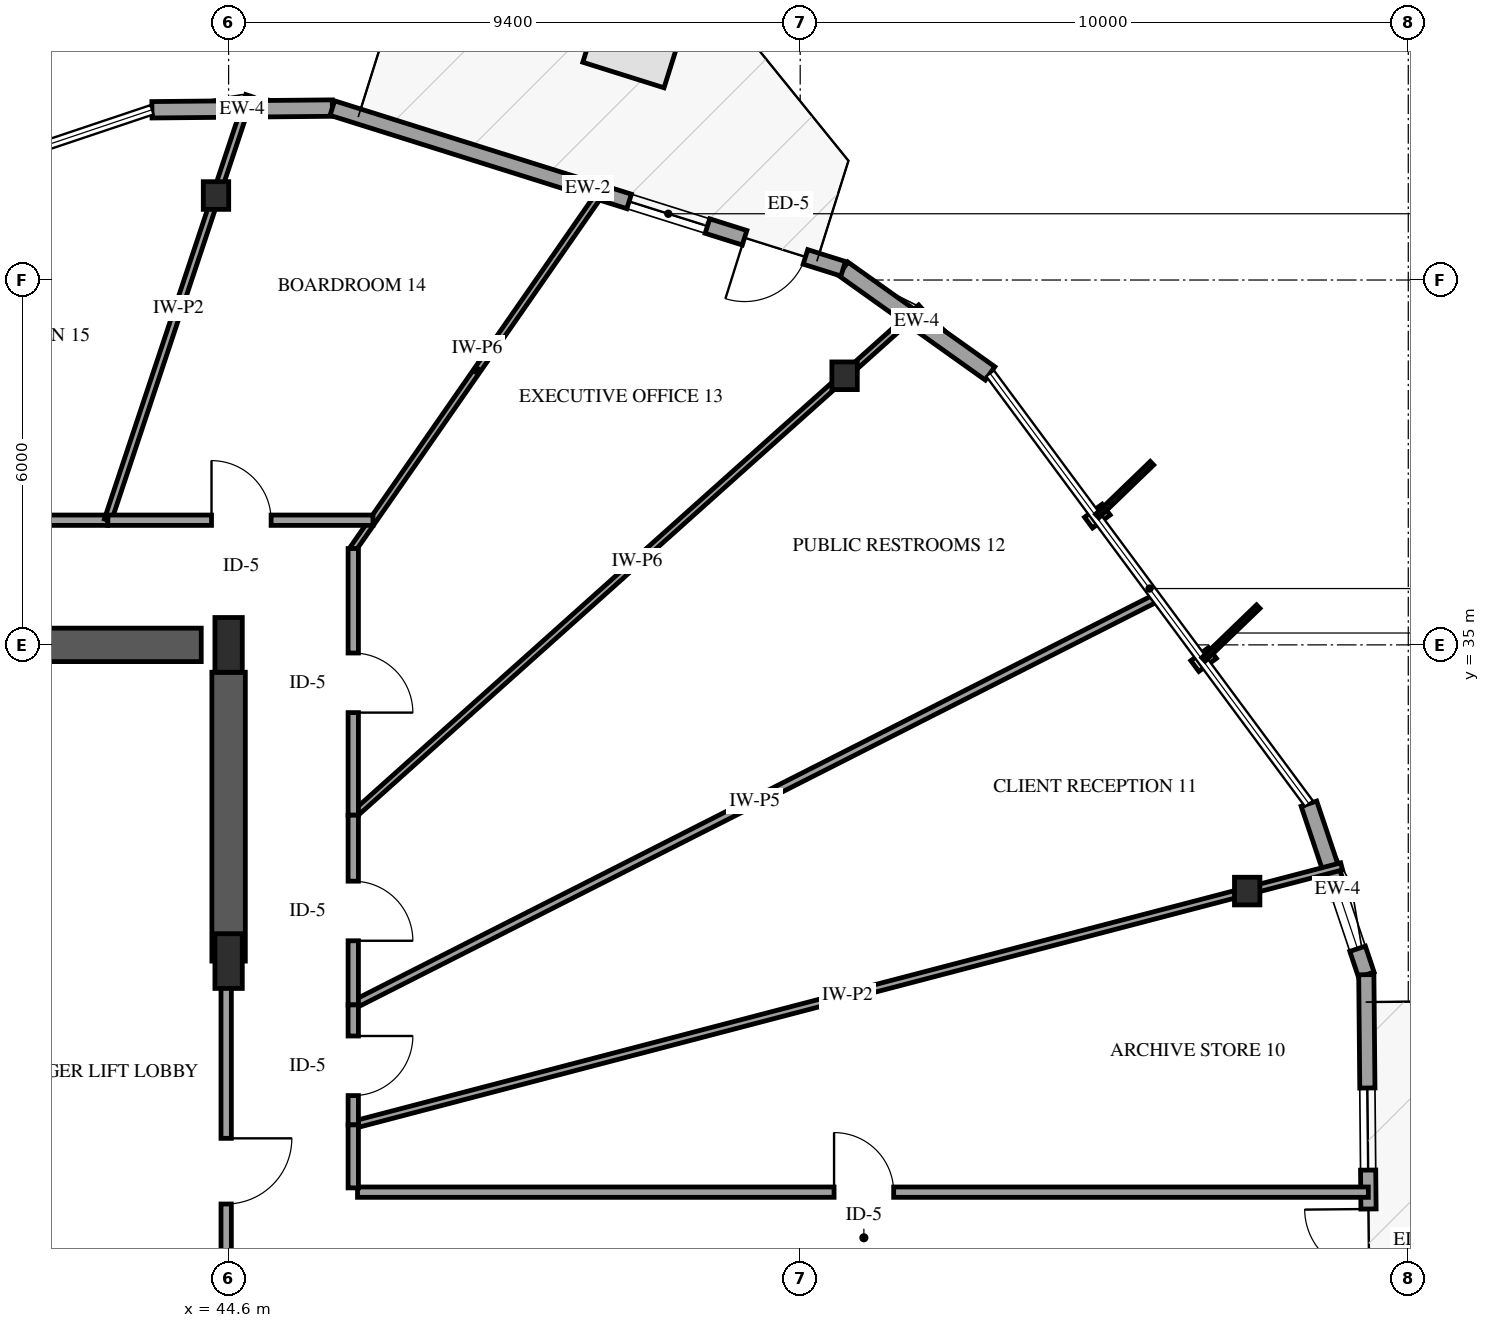
"""IFC4 building model, lengths in metres.
Left out: names, types, materials, properties, quantities, classifications, styles, units other than length and angle.
Written with IfcOpenShell. Run it as: python <this file> out.ifc"""

import sys

from ifc_helpers import new_model, si_unit, direction, frame, frame_2d, origin, origin_2d, place, context, subcontext, project, spatial, rectangle, i_section, extrude, element, fill, save


model = new_model("IFC4")
c1 = context("Model", 3, precision=1e-05, world=origin(), true_north=direction((0.0, 1.0)))
c2 = subcontext(c1, "Body", "Model", "MODEL_VIEW")
j1 = project(units=[si_unit("LENGTHUNIT", "METRE"), si_unit("PLANEANGLEUNIT", "RADIAN")], contexts=[c1])
p1 = place(None, origin())
s1 = spatial("IfcSite", under=j1, at=p1, CompositionType="ELEMENT")
p2 = place(p1, origin())
s2 = spatial("IfcBuilding", under=s1, at=p2, CompositionType="ELEMENT")
p3 = place(p2, frame((0.0, 0.0, 103.0)))
s3 = spatial("IfcBuildingStorey", under=s2, at=p3, CompositionType="ELEMENT", Elevation=103.0)
p4 = place(p3, frame((41.3, 35.0, 0.0), z_axis=(0.0, 0.0, 1.0), x_axis=(1.0, 0.0, 0.0)))
e1 = element("IfcWall", 1, at=p4, inside=s3, PredefinedType="SHEAR", context=c2, shape_type="SweptSolid", body=[
    extrude(rectangle(XDim=2.85, YDim=0.55, at=frame_2d((1.425, 0.0))), origin(), (0.0, 0.0, 1.0), 3.9),
])
p5 = place(p3, frame((44.6, 29.8, 0.0), z_axis=(0.0, 0.0, 1.0), x_axis=(0.0, 1.0, 0.0)))
e2 = element("IfcWall", 2, at=p5, inside=s3, PredefinedType="SHEAR", context=c2, shape_type="SweptSolid", body=[
    extrude(rectangle(XDim=4.75, YDim=0.55, at=frame_2d((2.375, 0.0))), origin(), (0.0, 0.0, 1.0), 3.9),
])
for number, where, z_axis, x_axis in (
    (3, (44.6, 29.8, 0.0), (0.0, 0.0, 1.0), (1.0, 0.0, 0.0)),
    (4, (44.6, 35.0, 0.0), (0.0, 0.0, 1.0), (1.0, 0.0, 0.0)),
):
    element("IfcColumn", number, at=place(p3, frame(where, z_axis=z_axis, x_axis=x_axis)), inside=s3, PredefinedType="PILASTER", context=c2, shape_type="SweptSolid", body=[
        extrude(rectangle(XDim=0.45, YDim=0.9, at=origin_2d()), origin(), (0.0, 0.0, 1.0), 3.9),
    ])
for number, where, z_axis, x_axis in (
    (5, (61.351, 30.951, 0.0), (0.0, 0.0, 1.0), (1.0, 0.0, 0.0)),
    (6, (54.73, 39.425, 0.0), (0.0, 0.0, 1.0), (1.0, 0.0, 0.0)),
    (7, (44.393, 42.389, 0.0), (0.0, 0.0, 1.0), (1.0, 0.0, 0.0)),
):
    element("IfcColumn", number, at=place(p3, frame(where, z_axis=z_axis, x_axis=x_axis)), inside=s3, PredefinedType="COLUMN", context=c2, shape_type="SweptSolid", body=[
        extrude(i_section(OverallWidth=0.418, OverallDepth=0.455, WebThickness=0.042, FlangeThickness=0.068, FilletRadius=0.038, at=origin_2d()), origin(), (0.0, 0.0, 1.0), 3.9),
    ])
for number, where, z_axis, x_axis in (
    (8, (57.123, 39.464, 0.0), (0.0, 0.0, 1.0), (-0.814, 0.58, 0.0)),
    (9, (46.306, 43.827, 0.0), (0.0, 0.0, 1.0), (-1.0, -0.009, 0.0)),
):
    element("IfcWall", number, at=place(p3, frame(where, z_axis=z_axis, x_axis=x_axis)), inside=s3, PredefinedType="SOLIDWALL", context=c2, shape_type="SweptSolid", body=[
        extrude(rectangle(XDim=2.967, YDim=0.27, at=frame_2d((1.483, 0.0))), origin(), (0.0, 0.0, 1.0), 2.979),
    ])
p6 = place(p3, frame((54.707, 41.185, 0.0), z_axis=(0.0, 0.0, 1.0), x_axis=(-0.953934793106, 0.300014017175, 0.0)))
e10 = element("IfcWall", 10, at=p6, inside=s3, PredefinedType="SOLIDWALL", context=c2, shape_type="SweptSolid", body=[
    extrude(rectangle(XDim=8.807, YDim=0.25, at=frame_2d((4.403, 0.0))), origin(), (0.0, 0.0, 1.0), 2.979),
])
p7 = place(p6, frame((0.65, 0.0, 0.0)))
e11 = element("IfcOpeningElement", 11, at=p7, cuts=e10, PredefinedType="OPENING", context=c2, shape_type="SweptSolid", body=[
    extrude(rectangle(XDim=1.05, YDim=2.15, at=frame_2d((0.525, 1.075))), frame((0.0, 0.135, 0.0), z_axis=(0.0, -1.0, 0.0), x_axis=(1.0, 0.0, 0.0)), (0.0, 0.0, 1.0), 0.27),
])
p8 = place(p6, frame((2.34, 0.0, 0.72)))
e12 = element("IfcOpeningElement", 12, at=p8, cuts=e10, PredefinedType="OPENING", context=c2, shape_type="SweptSolid", body=[
    extrude(rectangle(XDim=1.35, YDim=1.65, at=frame_2d((0.675, 0.825))), frame((0.0, 0.135, 0.0), z_axis=(0.0, -1.0, 0.0), x_axis=(1.0, 0.0, 0.0)), (0.0, 0.0, 1.0), 0.27),
])
p9 = place(p3, frame((63.31, 29.576, 0.0), z_axis=(0.0, 0.0, 1.0), x_axis=(-0.317980066672, 0.948097398583, 0.0)))
e13 = element("IfcWall", 13, at=p9, inside=s3, PredefinedType="SOLIDWALL", context=c2, shape_type="SweptSolid", body=[
    extrude(rectangle(XDim=2.967, YDim=0.27, at=frame_2d((1.483, 0.0))), origin(), (0.0, 0.0, 1.0), 2.979),
])
p10 = place(p9, frame((0.45, 0.0, 0.75)))
e14 = element("IfcOpeningElement", 14, at=p10, cuts=e13, PredefinedType="OPENING", context=c2, shape_type="SweptSolid", body=[
    extrude(rectangle(XDim=0.9, YDim=1.5, at=frame_2d((0.45, 0.75))), frame((0.0, 0.145, 0.0), z_axis=(0.0, -1.0, 0.0), x_axis=(1.0, 0.0, 0.0)), (0.0, 0.0, 1.0), 0.29),
])
p11 = place(p3, frame((63.393, 20.77, 0.0), z_axis=(0.0, 0.0, 1.0), x_axis=(-0.009425958451, 0.999955574667, 0.0)))
e15 = element("IfcWall", 15, at=p11, inside=s3, PredefinedType="SOLIDWALL", context=c2, shape_type="SweptSolid", body=[
    extrude(rectangle(XDim=8.806, YDim=0.25, at=frame_2d((4.403, 0.0))), origin(), (0.0, 0.0, 1.0), 2.979),
])
p12 = place(p11, frame((3.903, 0.0, 0.0)))
e16 = element("IfcOpeningElement", 16, at=p12, cuts=e15, PredefinedType="OPENING", context=c2, shape_type="SweptSolid", body=[
    extrude(rectangle(XDim=1.05, YDim=2.15, at=frame_2d((0.525, 1.075))), frame((0.0, 0.135, 0.0), z_axis=(0.0, -1.0, 0.0), x_axis=(1.0, 0.0, 0.0)), (0.0, 0.0, 1.0), 0.27),
])
p13 = place(p11, frame((0.44, 0.0, 0.72)))
e17 = element("IfcOpeningElement", 17, at=p13, cuts=e15, PredefinedType="OPENING", context=c2, shape_type="SweptSolid", body=[
    extrude(rectangle(XDim=1.35, YDim=1.65, at=frame_2d((0.675, 0.825))), frame((0.0, 0.135, 0.0), z_axis=(0.0, -1.0, 0.0), x_axis=(1.0, 0.0, 0.0)), (0.0, 0.0, 1.0), 0.27),
])
p14 = place(p11, frame((5.593, 0.0, 0.72)))
e18 = element("IfcOpeningElement", 18, at=p14, cuts=e15, PredefinedType="OPENING", context=c2, shape_type="SweptSolid", body=[
    extrude(rectangle(XDim=1.35, YDim=1.65, at=frame_2d((0.675, 0.825))), frame((0.0, 0.135, 0.0), z_axis=(0.0, -1.0, 0.0), x_axis=(1.0, 0.0, 0.0)), (0.0, 0.0, 1.0), 0.27),
])
p15 = place(p3, frame((46.65, 27.106, 0.0), z_axis=(0.0, 0.0, 1.0), x_axis=(0.967460609726, 0.253021676203, 0.0)))
e19 = element("IfcWall", 19, at=p15, inside=s3, PredefinedType="PARTITIONING", context=c2, shape_type="SweptSolid", body=[
    extrude(rectangle(XDim=16.801, YDim=0.12, at=frame_2d((8.4, 0.0))), origin(), (0.0, 0.0, 1.0), 2.895),
])
p16 = place(p3, frame((46.72, 26.0, 0.0), z_axis=(0.0, 0.0, 1.0), x_axis=(1.0, 0.0, 0.0)))
e20 = element("IfcWall", 20, at=p16, inside=s3, PredefinedType="PARTITIONING", context=c2, shape_type="SweptSolid", body=[
    extrude(rectangle(XDim=16.623, YDim=0.17, at=frame_2d((8.312, 0.0))), origin(), (0.0, 0.0, 1.0), 3.6),
])
p17 = place(p16, frame((7.837, 0.0, 0.0)))
e21 = element("IfcOpeningElement", 21, at=p17, cuts=e20, PredefinedType="OPENING", context=c2, shape_type="SweptSolid", body=[
    extrude(rectangle(XDim=0.98, YDim=2.15, at=frame_2d((0.49, 1.075))), frame((0.0, 0.095, 0.0), z_axis=(0.0, -1.0, 0.0), x_axis=(1.0, 0.0, 0.0)), (0.0, 0.0, 1.0), 0.19),
])
p18 = place(p3, frame((46.65, 29.079, 0.0), z_axis=(0.0, 0.0, 1.0), x_axis=(0.891987023653, 0.452061002117, 0.0)))
e22 = element("IfcWall", 22, at=p18, inside=s3, PredefinedType="PARTITIONING", context=c2, shape_type="SweptSolid", body=[
    extrude(rectangle(XDim=14.807, YDim=0.13, at=frame_2d((7.404, 0.0))), origin(), (0.0, 0.0, 1.0), 3.6),
])
p19 = place(p3, frame((46.65, 32.199, 0.0), z_axis=(0.0, 0.0, 1.0), x_axis=(0.74533867863, 0.666686023655, 0.0)))
e23 = element("IfcWall", 23, at=p19, inside=s3, PredefinedType="PARTITIONING", context=c2, shape_type="SweptSolid", body=[
    extrude(rectangle(XDim=12.525, YDim=0.11, at=frame_2d((6.262, 0.0))), origin(), (0.0, 0.0, 1.0), 2.978),
])
p20 = place(p3, frame((34.81, 37.05, 0.0), z_axis=(0.0, 0.0, 1.0), x_axis=(1.0, 0.0, 0.0)))
e24 = element("IfcWall", 24, at=p20, inside=s3, PredefinedType="PARTITIONING", context=c2, shape_type="SweptSolid", body=[
    extrude(rectangle(XDim=7.804, YDim=0.17, at=frame_2d((3.902, 0.0))), origin(), (0.0, 0.0, 1.0), 3.6),
])
p21 = place(p20, frame((3.427, 0.0, 0.0)))
e25 = element("IfcOpeningElement", 25, at=p21, cuts=e24, PredefinedType="OPENING", context=c2, shape_type="SweptSolid", body=[
    extrude(rectangle(XDim=0.98, YDim=2.15, at=frame_2d((0.49, 1.075))), frame((0.0, 0.095, 0.0), z_axis=(0.0, -1.0, 0.0), x_axis=(1.0, 0.0, 0.0)), (0.0, 0.0, 1.0), 0.19),
])
p22 = place(p3, frame((42.614, 37.05, 0.0), z_axis=(0.0, 0.0, 1.0), x_axis=(0.3159789006, 0.948766216924, 0.0)))
e26 = element("IfcWall", 26, at=p22, inside=s3, PredefinedType="PARTITIONING", context=c2, shape_type="SweptSolid", body=[
    extrude(rectangle(XDim=7.358, YDim=0.12, at=frame_2d((3.679, 0.0))), origin(), (0.0, 0.0, 1.0), 2.895),
])
p23 = place(p3, frame((46.65, 36.584, 0.0), z_axis=(0.0, 0.0, 1.0), x_axis=(0.570692229292, 0.821164039292, 0.0)))
e27 = element("IfcWall", 27, at=p23, inside=s3, PredefinedType="PARTITIONING", context=c2, shape_type="SweptSolid", body=[
    extrude(rectangle(XDim=7.13, YDim=0.11, at=frame_2d((3.565, 0.0))), origin(), (0.0, 0.0, 1.0), 2.974),
])
p24 = place(p3, frame((44.56, 29.8, 0.0), z_axis=(0.0, 0.0, 1.0), x_axis=(0.0, -1.0, 0.0)))
e28 = element("IfcWall", 28, at=p24, inside=s3, PredefinedType="PARTITIONING", context=c2, shape_type="SweptSolid", body=[
    extrude(rectangle(XDim=6.91, YDim=0.17, at=frame_2d((3.455, 0.0))), origin(), (0.0, 0.0, 1.0), 2.64),
])
p25 = place(p24, frame((2.915, 0.0, 0.0)))
e29 = element("IfcOpeningElement", 29, at=p25, cuts=e28, PredefinedType="OPENING", context=c2, shape_type="SweptSolid", body=[
    extrude(rectangle(XDim=1.08, YDim=2.15, at=frame_2d((0.54, 1.075))), frame((0.0, 0.095, 0.0), z_axis=(0.0, -1.0, 0.0), x_axis=(1.0, 0.0, 0.0)), (0.0, 0.0, 1.0), 0.19),
])
p26 = place(p3, frame((46.65, 36.584, 0.0), z_axis=(0.0, 0.0, 1.0), x_axis=(0.0, -1.0, 0.0)))
e30 = element("IfcWall", 30, at=p26, inside=s3, PredefinedType="PARTITIONING", context=c2, shape_type="SweptSolid", body=[
    extrude(rectangle(XDim=4.385, YDim=0.17, at=frame_2d((2.192, 0.0))), origin(), (0.0, 0.0, 1.0), 3.6),
])
p27 = place(p26, frame((1.718, 0.0, 0.0)))
e31 = element("IfcOpeningElement", 31, at=p27, cuts=e30, PredefinedType="OPENING", context=c2, shape_type="SweptSolid", body=[
    extrude(rectangle(XDim=0.98, YDim=2.15, at=frame_2d((0.49, 1.075))), frame((0.0, 0.095, 0.0), z_axis=(0.0, -1.0, 0.0), x_axis=(1.0, 0.0, 0.0)), (0.0, 0.0, 1.0), 0.19),
])
p28 = place(p3, frame((42.614, 37.05, 0.0), z_axis=(0.0, 0.0, 1.0), x_axis=(1.0, 0.0, 0.0)))
e32 = element("IfcWall", 32, at=p28, inside=s3, PredefinedType="PARTITIONING", context=c2, shape_type="SweptSolid", body=[
    extrude(rectangle(XDim=4.36, YDim=0.17, at=frame_2d((2.18, 0.0))), origin(), (0.0, 0.0, 1.0), 3.6),
])
p29 = place(p28, frame((1.705, 0.0, 0.0)))
e33 = element("IfcOpeningElement", 33, at=p29, cuts=e32, PredefinedType="OPENING", context=c2, shape_type="SweptSolid", body=[
    extrude(rectangle(XDim=0.98, YDim=2.15, at=frame_2d((0.49, 1.075))), frame((0.0, 0.095, 0.0), z_axis=(0.0, -1.0, 0.0), x_axis=(1.0, 0.0, 0.0)), (0.0, 0.0, 1.0), 0.19),
])
p30 = place(p3, frame((46.65, 32.199, 0.0), z_axis=(0.0, 0.0, 1.0), x_axis=(0.0, -1.0, 0.0)))
e34 = element("IfcWall", 34, at=p30, inside=s3, PredefinedType="PARTITIONING", context=c2, shape_type="SweptSolid", body=[
    extrude(rectangle(XDim=3.12, YDim=0.17, at=frame_2d((1.56, 0.0))), origin(), (0.0, 0.0, 1.0), 3.6),
])
p31 = place(p30, frame((1.085, 0.0, 0.0)))
e35 = element("IfcOpeningElement", 35, at=p31, cuts=e34, PredefinedType="OPENING", context=c2, shape_type="SweptSolid", body=[
    extrude(rectangle(XDim=0.98, YDim=2.15, at=frame_2d((0.49, 1.075))), frame((0.0, 0.095, 0.0), z_axis=(0.0, -1.0, 0.0), x_axis=(1.0, 0.0, 0.0)), (0.0, 0.0, 1.0), 0.19),
])
p32 = place(p3, frame((46.65, 29.079, 0.0), z_axis=(0.0, 0.0, 1.0), x_axis=(0.0, -1.0, 0.0)))
e36 = element("IfcWall", 36, at=p32, inside=s3, PredefinedType="PARTITIONING", context=c2, shape_type="SweptSolid", body=[
    extrude(rectangle(XDim=1.973, YDim=0.17, at=frame_2d((0.987, 0.0))), origin(), (0.0, 0.0, 1.0), 3.6),
])
p33 = place(p32, frame((0.511, 0.0, 0.0)))
e37 = element("IfcOpeningElement", 37, at=p33, cuts=e36, PredefinedType="OPENING", context=c2, shape_type="SweptSolid", body=[
    extrude(rectangle(XDim=0.98, YDim=2.15, at=frame_2d((0.49, 1.075))), frame((0.0, 0.095, 0.0), z_axis=(0.0, -1.0, 0.0), x_axis=(1.0, 0.0, 0.0)), (0.0, 0.0, 1.0), 0.19),
])
p34 = place(p3, frame((46.65, 27.106, 0.0), z_axis=(0.0, 0.0, 1.0), x_axis=(0.0, -1.0, 0.0)))
e38 = element("IfcWall", 38, at=p34, inside=s3, PredefinedType="PARTITIONING", context=c2, shape_type="SweptSolid", body=[
    extrude(rectangle(XDim=1.036, YDim=0.17, at=frame_2d((0.518, 0.0))), origin(), (0.0, 0.0, 1.0), 3.6),
])
p35 = place(p7, origin())
e39 = element("IfcDoor", 39, at=p35, inside=s3, OperationType="SINGLE_SWING_RIGHT", PredefinedType="DOOR", context=c2, shape_type="SweptSolid", body=[
    extrude(rectangle(XDim=1.05, YDim=2.15, at=frame_2d((0.525, 1.075))), frame((0.0, 0.025, 0.0), z_axis=(0.0, -1.0, 0.0), x_axis=(1.0, 0.0, 0.0)), (0.0, 0.0, 1.0), 0.05),
])
fill(e11, e39)
p36 = place(p8, origin())
e40 = element("IfcWindow", 40, at=p36, inside=s3, PartitioningType="SINGLE_PANEL", PredefinedType="WINDOW", context=c2, shape_type="SweptSolid", body=[
    extrude(rectangle(XDim=1.35, YDim=1.65, at=frame_2d((0.675, 0.825))), frame((0.0, 0.03, 0.0), z_axis=(0.0, -1.0, 0.0), x_axis=(1.0, 0.0, 0.0)), (0.0, 0.0, 1.0), 0.06),
])
fill(e12, e40)
p37 = place(p10, origin())
e41 = element("IfcWindow", 41, at=p37, inside=s3, PartitioningType="SINGLE_PANEL", PredefinedType="WINDOW", context=c2, shape_type="SweptSolid", body=[
    extrude(rectangle(XDim=0.9, YDim=1.5, at=frame_2d((0.45, 0.75))), frame((0.0, 0.03, 0.0), z_axis=(0.0, -1.0, 0.0), x_axis=(1.0, 0.0, 0.0)), (0.0, 0.0, 1.0), 0.06),
])
fill(e14, e41)
p38 = place(p12, origin())
e42 = element("IfcDoor", 42, at=p38, inside=s3, OperationType="SINGLE_SWING_RIGHT", PredefinedType="DOOR", context=c2, shape_type="SweptSolid", body=[
    extrude(rectangle(XDim=1.05, YDim=2.15, at=frame_2d((0.525, 1.075))), frame((0.0, 0.025, 0.0), z_axis=(0.0, -1.0, 0.0), x_axis=(1.0, 0.0, 0.0)), (0.0, 0.0, 1.0), 0.05),
])
fill(e16, e42)
p39 = place(p14, origin())
e43 = element("IfcWindow", 43, at=p39, inside=s3, PartitioningType="SINGLE_PANEL", PredefinedType="WINDOW", context=c2, shape_type="SweptSolid", body=[
    extrude(rectangle(XDim=1.35, YDim=1.65, at=frame_2d((0.675, 0.825))), frame((0.0, 0.03, 0.0), z_axis=(0.0, -1.0, 0.0), x_axis=(1.0, 0.0, 0.0)), (0.0, 0.0, 1.0), 0.06),
])
fill(e18, e43)
p40 = place(p17, origin())
e44 = element("IfcDoor", 44, at=p40, inside=s3, OperationType="SINGLE_SWING_LEFT", PredefinedType="DOOR", context=c2, shape_type="SweptSolid", body=[
    extrude(rectangle(XDim=0.98, YDim=2.15, at=frame_2d((0.49, 1.075))), frame((0.0, 0.025, 0.0), z_axis=(0.0, -1.0, 0.0), x_axis=(1.0, 0.0, 0.0)), (0.0, 0.0, 1.0), 0.05),
])
fill(e21, e44)
p41 = place(p25, origin())
e45 = element("IfcDoor", 45, at=p41, inside=s3, OperationType="SINGLE_SWING_LEFT", PredefinedType="DOOR", context=c2, shape_type="SweptSolid", body=[
    extrude(rectangle(XDim=1.08, YDim=2.15, at=frame_2d((0.54, 1.075))), frame((0.0, 0.025, 0.0), z_axis=(0.0, -1.0, 0.0), x_axis=(1.0, 0.0, 0.0)), (0.0, 0.0, 1.0), 0.05),
])
fill(e29, e45)
p42 = place(p27, origin())
e46 = element("IfcDoor", 46, at=p42, inside=s3, OperationType="SINGLE_SWING_RIGHT", PredefinedType="DOOR", context=c2, shape_type="SweptSolid", body=[
    extrude(rectangle(XDim=0.98, YDim=2.15, at=frame_2d((0.49, 1.075))), frame((0.0, 0.025, 0.0), z_axis=(0.0, -1.0, 0.0), x_axis=(1.0, 0.0, 0.0)), (0.0, 0.0, 1.0), 0.05),
])
fill(e31, e46)
p43 = place(p29, origin())
e47 = element("IfcDoor", 47, at=p43, inside=s3, OperationType="SINGLE_SWING_LEFT", PredefinedType="DOOR", context=c2, shape_type="SweptSolid", body=[
    extrude(rectangle(XDim=0.98, YDim=2.15, at=frame_2d((0.49, 1.075))), frame((0.0, 0.025, 0.0), z_axis=(0.0, -1.0, 0.0), x_axis=(1.0, 0.0, 0.0)), (0.0, 0.0, 1.0), 0.05),
])
fill(e33, e47)
p44 = place(p31, origin())
e48 = element("IfcDoor", 48, at=p44, inside=s3, OperationType="SINGLE_SWING_RIGHT", PredefinedType="DOOR", context=c2, shape_type="SweptSolid", body=[
    extrude(rectangle(XDim=0.98, YDim=2.15, at=frame_2d((0.49, 1.075))), frame((0.0, 0.025, 0.0), z_axis=(0.0, -1.0, 0.0), x_axis=(1.0, 0.0, 0.0)), (0.0, 0.0, 1.0), 0.05),
])
fill(e35, e48)
p45 = place(p33, origin())
e49 = element("IfcDoor", 49, at=p45, inside=s3, OperationType="SINGLE_SWING_LEFT", PredefinedType="DOOR", context=c2, shape_type="SweptSolid", body=[
    extrude(rectangle(XDim=0.98, YDim=2.15, at=frame_2d((0.49, 1.075))), frame((0.0, 0.025, 0.0), z_axis=(0.0, -1.0, 0.0), x_axis=(1.0, 0.0, 0.0)), (0.0, 0.0, 1.0), 0.05),
])
fill(e37, e49)
save(model, sys.argv[1])
